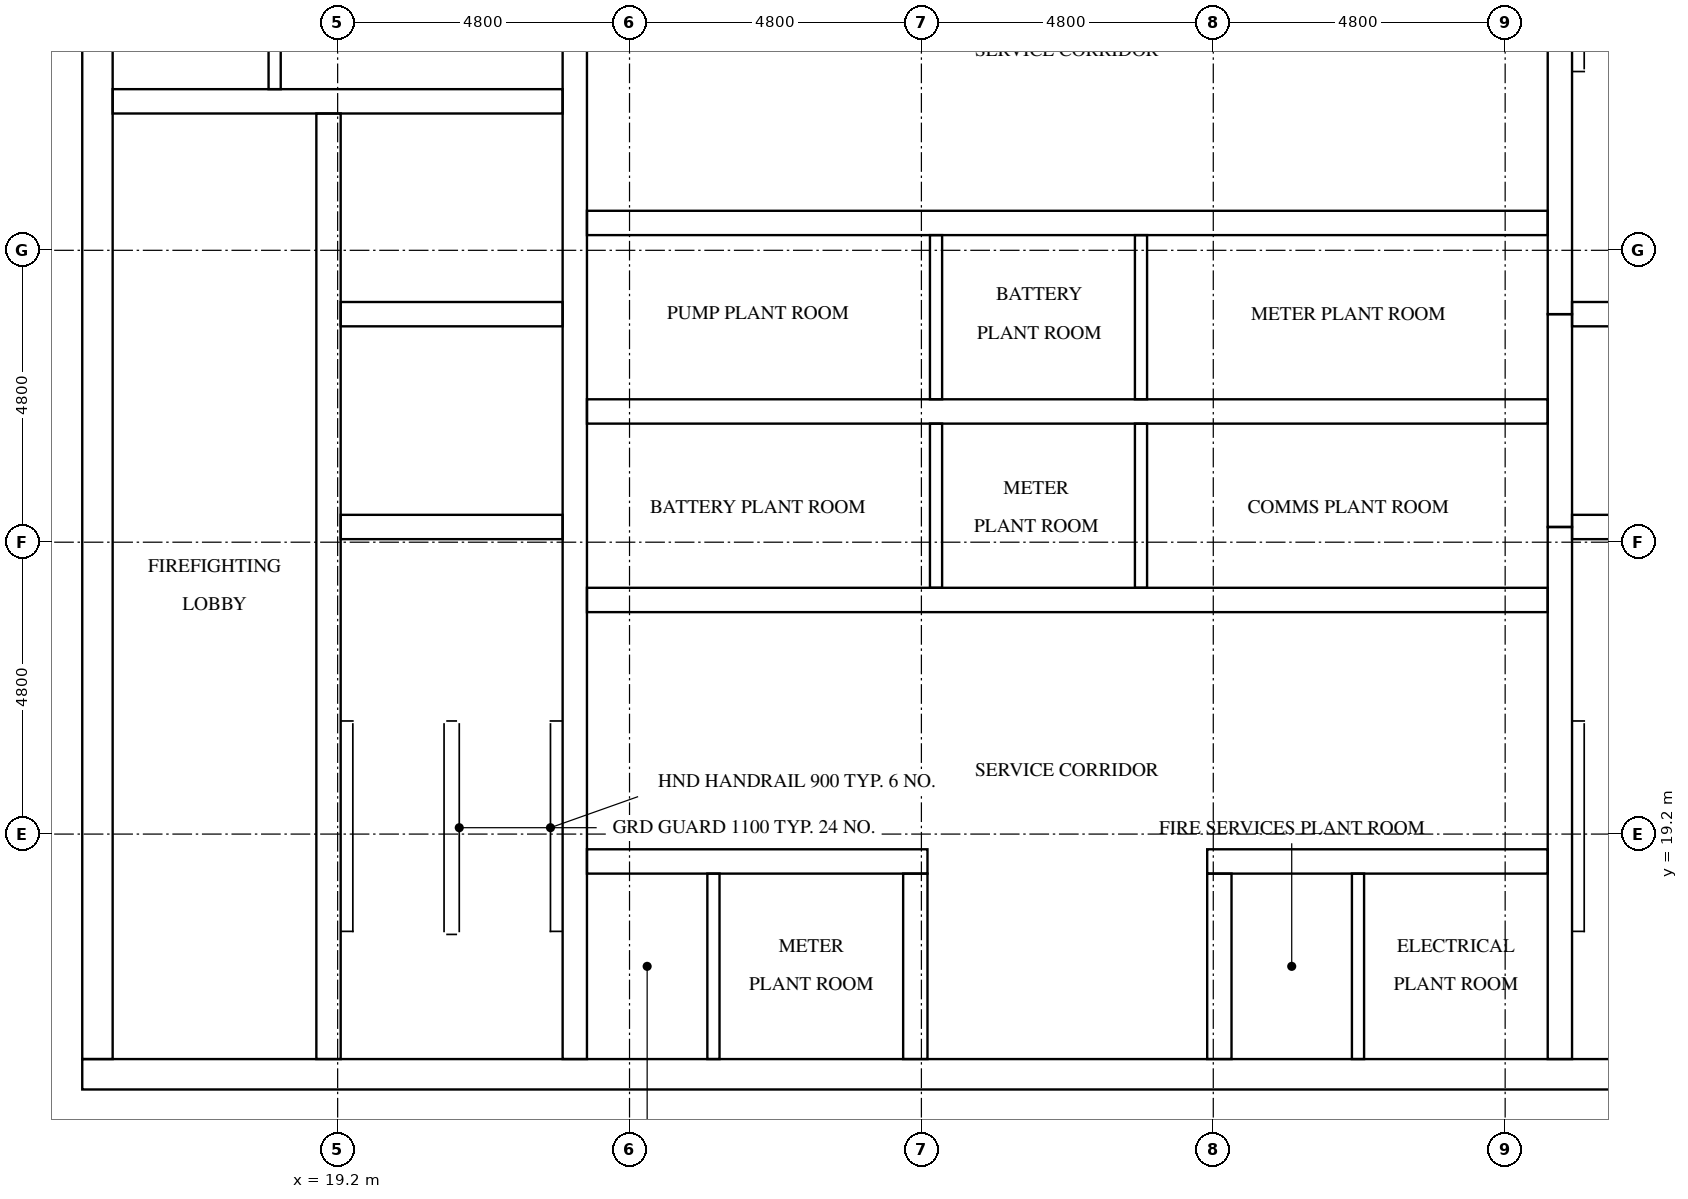
"""IFC4 building model, lengths in metres.
Left out: names, types, materials, properties, quantities, classifications, styles, units other than length and angle.
Written with IfcOpenShell. Run it as: python <this file> out.ifc"""

import sys

from ifc_helpers import new_model, si_unit, direction, frame, frame_2d, origin, place, context, subcontext, project, spatial, rectangle, extrude, element, fill, save


model = new_model("IFC4")
c1 = context("Model", 3, precision=1e-05, world=origin(), true_north=direction((0.0, 1.0)))
c2 = subcontext(c1, "Body", "Model", "MODEL_VIEW")
j1 = project(units=[si_unit("LENGTHUNIT", "METRE"), si_unit("PLANEANGLEUNIT", "RADIAN")], contexts=[c1])
p1 = place(None, origin())
s1 = spatial("IfcSite", under=j1, at=p1, CompositionType="ELEMENT")
p2 = place(p1, origin())
s2 = spatial("IfcBuilding", under=s1, at=p2, CompositionType="ELEMENT")
p3 = place(p2, frame((0.0, 0.0, 305.9)))
s3 = spatial("IfcBuildingStorey", under=s2, at=p3, CompositionType="ELEMENT", Elevation=305.9)
p4 = place(p3, frame((15.0, 15.25, 0.0), z_axis=(0.0, 0.0, 1.0), x_axis=(1.0, 0.0, 0.0)))
e1 = element("IfcWall", 1, at=p4, inside=s3, PredefinedType="SHEAR", context=c2, shape_type="SweptSolid", body=[
    extrude(rectangle(XDim=32.4, YDim=0.5, at=frame_2d((16.2, 0.0))), origin(), (0.0, 0.0, 1.0), 3.8),
])
p5 = place(p4, frame((15.3, 0.0, 0.0)))
e2 = element("IfcOpeningElement", 2, at=p5, cuts=e1, PredefinedType="OPENING", context=c2, shape_type="SweptSolid", body=[
    extrude(rectangle(XDim=1.8, YDim=2.1, at=frame_2d((0.9, 1.05))), frame((0.0, 0.26, 0.0), z_axis=(0.0, -1.0, 0.0), x_axis=(1.0, 0.0, 0.0)), (0.0, 0.0, 1.0), 0.52),
])
p6 = place(p3, frame((15.25, 15.5, 0.0), z_axis=(0.0, 0.0, 1.0), x_axis=(0.0, 1.0, 0.0)))
e3 = element("IfcWall", 3, at=p6, inside=s3, PredefinedType="SHEAR", context=c2, shape_type="SweptSolid", body=[
    extrude(rectangle(XDim=21.8, YDim=0.5, at=frame_2d((10.9, 0.0))), origin(), (0.0, 0.0, 1.0), 3.8),
])
p7 = place(p6, frame((5.26, 0.0, 0.0)))
e4 = element("IfcOpeningElement", 4, at=p7, cuts=e3, PredefinedType="OPENING", context=c2, shape_type="SweptSolid", body=[
    extrude(rectangle(XDim=1.2, YDim=2.1, at=frame_2d((0.6, 1.05))), frame((0.0, 0.26, 0.0), z_axis=(0.0, -1.0, 0.0), x_axis=(1.0, 0.0, 0.0)), (0.0, 0.0, 1.0), 0.52),
])
p8 = place(p3, frame((19.05, 15.5, 0.0), z_axis=(0.0, 0.0, 1.0), x_axis=(0.0, 1.0, 0.0)))
e5 = element("IfcWall", 5, at=p8, inside=s3, PredefinedType="SHEAR", context=c2, shape_type="SweptSolid", body=[
    extrude(rectangle(XDim=15.55, YDim=0.4, at=frame_2d((7.775, 0.0))), origin(), (0.0, 0.0, 1.0), 3.8),
])
p9 = place(p8, frame((9.95, 0.0, 0.0)))
e6 = element("IfcOpeningElement", 6, at=p9, cuts=e5, PredefinedType="OPENING", context=c2, shape_type="SweptSolid", body=[
    extrude(rectangle(XDim=1.1, YDim=2.1, at=frame_2d((0.55, 1.05))), frame((0.0, 0.21, 0.0), z_axis=(0.0, -1.0, 0.0), x_axis=(1.0, 0.0, 0.0)), (0.0, 0.0, 1.0), 0.42),
])
p10 = place(p8, frame((13.45, 0.0, 0.0)))
e7 = element("IfcOpeningElement", 7, at=p10, cuts=e5, PredefinedType="OPENING", context=c2, shape_type="SweptSolid", body=[
    extrude(rectangle(XDim=1.1, YDim=2.1, at=frame_2d((0.55, 1.05))), frame((0.0, 0.21, 0.0), z_axis=(0.0, -1.0, 0.0), x_axis=(1.0, 0.0, 0.0)), (0.0, 0.0, 1.0), 0.42),
])
p11 = place(p8, frame((0.7, 0.0, 0.0)))
e8 = element("IfcOpeningElement", 8, at=p11, cuts=e5, PredefinedType="OPENING", context=c2, shape_type="SweptSolid", body=[
    extrude(rectangle(XDim=1.2, YDim=2.1, at=frame_2d((0.6, 1.05))), frame((0.0, 0.21, 0.0), z_axis=(0.0, -1.0, 0.0), x_axis=(1.0, 0.0, 0.0)), (0.0, 0.0, 1.0), 0.42),
])
p12 = place(p3, frame((23.1, 15.5, 0.0), z_axis=(0.0, 0.0, 1.0), x_axis=(0.0, 1.0, 0.0)))
e9 = element("IfcWall", 9, at=p12, inside=s3, PredefinedType="SHEAR", context=c2, shape_type="SweptSolid", body=[
    extrude(rectangle(XDim=21.8, YDim=0.4, at=frame_2d((10.9, 0.0))), origin(), (0.0, 0.0, 1.0), 3.8),
])
p13 = place(p3, frame((39.3, 15.5, 0.0), z_axis=(0.0, 0.0, 1.0), x_axis=(0.0, 1.0, 0.0)))
e10 = element("IfcWall", 10, at=p13, inside=s3, PredefinedType="SHEAR", context=c2, shape_type="SweptSolid", body=[
    extrude(rectangle(XDim=8.75, YDim=0.4, at=frame_2d((4.375, 0.0))), origin(), (0.0, 0.0, 1.0), 3.8),
])
p14 = place(p3, frame((39.3, 24.25, 0.0), z_axis=(0.0, 0.0, 1.0), x_axis=(0.0, 1.0, 0.0)))
e11 = element("IfcWall", 11, at=p14, inside=s3, PredefinedType="SHEAR", context=c2, shape_type="SweptSolid", body=[
    extrude(rectangle(XDim=3.5, YDim=0.4, at=frame_2d((1.75, 0.0))), origin(), (0.0, 0.0, 1.0), 3.8),
])
p15 = place(p3, frame((39.3, 27.75, 0.0), z_axis=(0.0, 0.0, 1.0), x_axis=(0.0, 1.0, 0.0)))
e12 = element("IfcWall", 12, at=p15, inside=s3, PredefinedType="SHEAR", context=c2, shape_type="SweptSolid", body=[
    extrude(rectangle(XDim=9.55, YDim=0.4, at=frame_2d((4.775, 0.0))), origin(), (0.0, 0.0, 1.0), 3.8),
])
for number, where, z_axis, x_axis in (
    (13, (19.25, 24.25, 0.0), (0.0, 0.0, 1.0), (1.0, 0.0, 0.0)),
    (14, (19.25, 27.75, 0.0), (0.0, 0.0, 1.0), (1.0, 0.0, 0.0)),
):
    element("IfcWall", number, at=place(p3, frame(where, z_axis=z_axis, x_axis=x_axis)), inside=s3, PredefinedType="SHEAR", context=c2, shape_type="SweptSolid", body=[
        extrude(rectangle(XDim=3.65, YDim=0.4, at=frame_2d((1.825, 0.0))), origin(), (0.0, 0.0, 1.0), 3.8),
    ])
p16 = place(p3, frame((15.5, 31.25, 0.0), z_axis=(0.0, 0.0, 1.0), x_axis=(1.0, 0.0, 0.0)))
e15 = element("IfcWall", 15, at=p16, inside=s3, PredefinedType="SHEAR", context=c2, shape_type="SweptSolid", body=[
    extrude(rectangle(XDim=7.4, YDim=0.4, at=frame_2d((3.7, 0.0))), origin(), (0.0, 0.0, 1.0), 3.8),
])
for number, where, z_axis, x_axis in (
    (16, (39.5, 24.25, 0.0), (0.0, 0.0, 1.0), (1.0, 0.0, 0.0)),
    (17, (39.5, 27.75, 0.0), (0.0, 0.0, 1.0), (1.0, 0.0, 0.0)),
):
    element("IfcWall", number, at=place(p3, frame(where, z_axis=z_axis, x_axis=x_axis)), inside=s3, PredefinedType="SHEAR", context=c2, shape_type="SweptSolid", body=[
        extrude(rectangle(XDim=3.65, YDim=0.4, at=frame_2d((1.825, 0.0))), origin(), (0.0, 0.0, 1.0), 3.8),
    ])
p17 = place(p3, frame((23.3, 18.75, 0.0), z_axis=(0.0, 0.0, 1.0), x_axis=(1.0, 0.0, 0.0)))
e18 = element("IfcWall", 18, at=p17, inside=s3, PredefinedType="SHEAR", context=c2, shape_type="SweptSolid", body=[
    extrude(rectangle(XDim=5.6, YDim=0.4, at=frame_2d((2.8, 0.0))), origin(), (0.0, 0.0, 1.0), 3.8),
])
p18 = place(p17, frame((0.49, 0.0, 0.0)))
e19 = element("IfcOpeningElement", 19, at=p18, cuts=e18, PredefinedType="OPENING", context=c2, shape_type="SweptSolid", body=[
    extrude(rectangle(XDim=1.0, YDim=2.1, at=frame_2d((0.5, 1.05))), frame((0.0, 0.21, 0.0), z_axis=(0.0, -1.0, 0.0), x_axis=(1.0, 0.0, 0.0)), (0.0, 0.0, 1.0), 0.42),
])
p19 = place(p17, frame((3.19, 0.0, 0.0)))
e20 = element("IfcOpeningElement", 20, at=p19, cuts=e18, PredefinedType="OPENING", context=c2, shape_type="SweptSolid", body=[
    extrude(rectangle(XDim=1.0, YDim=2.1, at=frame_2d((0.5, 1.05))), frame((0.0, 0.21, 0.0), z_axis=(0.0, -1.0, 0.0), x_axis=(1.0, 0.0, 0.0)), (0.0, 0.0, 1.0), 0.42),
])
p20 = place(p3, frame((33.5, 18.75, 0.0), z_axis=(0.0, 0.0, 1.0), x_axis=(1.0, 0.0, 0.0)))
e21 = element("IfcWall", 21, at=p20, inside=s3, PredefinedType="SHEAR", context=c2, shape_type="SweptSolid", body=[
    extrude(rectangle(XDim=5.6, YDim=0.4, at=frame_2d((2.8, 0.0))), origin(), (0.0, 0.0, 1.0), 3.8),
])
p21 = place(p20, frame((0.89, 0.0, 0.0)))
e22 = element("IfcOpeningElement", 22, at=p21, cuts=e21, PredefinedType="OPENING", context=c2, shape_type="SweptSolid", body=[
    extrude(rectangle(XDim=1.0, YDim=2.1, at=frame_2d((0.5, 1.05))), frame((0.0, 0.21, 0.0), z_axis=(0.0, -1.0, 0.0), x_axis=(1.0, 0.0, 0.0)), (0.0, 0.0, 1.0), 0.42),
])
p22 = place(p20, frame((3.59, 0.0, 0.0)))
e23 = element("IfcOpeningElement", 23, at=p22, cuts=e21, PredefinedType="OPENING", context=c2, shape_type="SweptSolid", body=[
    extrude(rectangle(XDim=1.0, YDim=2.1, at=frame_2d((0.5, 1.05))), frame((0.0, 0.21, 0.0), z_axis=(0.0, -1.0, 0.0), x_axis=(1.0, 0.0, 0.0)), (0.0, 0.0, 1.0), 0.42),
])
p23 = place(p3, frame((23.3, 23.05, 0.0), z_axis=(0.0, 0.0, 1.0), x_axis=(1.0, 0.0, 0.0)))
e24 = element("IfcWall", 24, at=p23, inside=s3, PredefinedType="SHEAR", context=c2, shape_type="SweptSolid", body=[
    extrude(rectangle(XDim=15.8, YDim=0.4, at=frame_2d((7.9, 0.0))), origin(), (0.0, 0.0, 1.0), 3.8),
])
p24 = place(p23, frame((2.32, 0.0, 0.0)))
e25 = element("IfcOpeningElement", 25, at=p24, cuts=e24, PredefinedType="OPENING", context=c2, shape_type="SweptSolid", body=[
    extrude(rectangle(XDim=1.0, YDim=2.1, at=frame_2d((0.5, 1.05))), frame((0.0, 0.21, 0.0), z_axis=(0.0, -1.0, 0.0), x_axis=(1.0, 0.0, 0.0)), (0.0, 0.0, 1.0), 0.42),
])
p25 = place(p23, frame((6.926, 0.0, 0.0)))
e26 = element("IfcOpeningElement", 26, at=p25, cuts=e24, PredefinedType="OPENING", context=c2, shape_type="SweptSolid", body=[
    extrude(rectangle(XDim=1.0, YDim=2.1, at=frame_2d((0.5, 1.05))), frame((0.0, 0.21, 0.0), z_axis=(0.0, -1.0, 0.0), x_axis=(1.0, 0.0, 0.0)), (0.0, 0.0, 1.0), 0.42),
])
p26 = place(p23, frame((12.006, 0.0, 0.0)))
e27 = element("IfcOpeningElement", 27, at=p26, cuts=e24, PredefinedType="OPENING", context=c2, shape_type="SweptSolid", body=[
    extrude(rectangle(XDim=1.0, YDim=2.1, at=frame_2d((0.5, 1.05))), frame((0.0, 0.21, 0.0), z_axis=(0.0, -1.0, 0.0), x_axis=(1.0, 0.0, 0.0)), (0.0, 0.0, 1.0), 0.42),
])
p27 = place(p3, frame((23.3, 26.15, 0.0), z_axis=(0.0, 0.0, 1.0), x_axis=(1.0, 0.0, 0.0)))
e28 = element("IfcWall", 28, at=p27, inside=s3, PredefinedType="SHEAR", context=c2, shape_type="SweptSolid", body=[
    extrude(rectangle(XDim=15.8, YDim=0.4, at=frame_2d((7.9, 0.0))), origin(), (0.0, 0.0, 1.0), 3.8),
])
p28 = place(p3, frame((23.3, 29.25, 0.0), z_axis=(0.0, 0.0, 1.0), x_axis=(1.0, 0.0, 0.0)))
e29 = element("IfcWall", 29, at=p28, inside=s3, PredefinedType="SHEAR", context=c2, shape_type="SweptSolid", body=[
    extrude(rectangle(XDim=15.8, YDim=0.4, at=frame_2d((7.9, 0.0))), origin(), (0.0, 0.0, 1.0), 3.8),
])
p29 = place(p28, frame((2.32, 0.0, 0.0)))
e30 = element("IfcOpeningElement", 30, at=p29, cuts=e29, PredefinedType="OPENING", context=c2, shape_type="SweptSolid", body=[
    extrude(rectangle(XDim=1.0, YDim=2.1, at=frame_2d((0.5, 1.05))), frame((0.0, 0.21, 0.0), z_axis=(0.0, -1.0, 0.0), x_axis=(1.0, 0.0, 0.0)), (0.0, 0.0, 1.0), 0.42),
])
p30 = place(p28, frame((6.926, 0.0, 0.0)))
e31 = element("IfcOpeningElement", 31, at=p30, cuts=e29, PredefinedType="OPENING", context=c2, shape_type="SweptSolid", body=[
    extrude(rectangle(XDim=1.0, YDim=2.1, at=frame_2d((0.5, 1.05))), frame((0.0, 0.21, 0.0), z_axis=(0.0, -1.0, 0.0), x_axis=(1.0, 0.0, 0.0)), (0.0, 0.0, 1.0), 0.42),
])
p31 = place(p28, frame((12.006, 0.0, 0.0)))
e32 = element("IfcOpeningElement", 32, at=p31, cuts=e29, PredefinedType="OPENING", context=c2, shape_type="SweptSolid", body=[
    extrude(rectangle(XDim=1.0, YDim=2.1, at=frame_2d((0.5, 1.05))), frame((0.0, 0.21, 0.0), z_axis=(0.0, -1.0, 0.0), x_axis=(1.0, 0.0, 0.0)), (0.0, 0.0, 1.0), 0.42),
])
for number, where, z_axis, x_axis in (
    (33, (28.7, 15.5, 0.0), (0.0, 0.0, 1.0), (0.0, 1.0, 0.0)),
    (34, (33.7, 15.5, 0.0), (0.0, 0.0, 1.0), (0.0, 1.0, 0.0)),
):
    element("IfcWall", number, at=place(p3, frame(where, z_axis=z_axis, x_axis=x_axis)), inside=s3, PredefinedType="SHEAR", context=c2, shape_type="SweptSolid", body=[
        extrude(rectangle(XDim=3.05, YDim=0.4, at=frame_2d((1.525, 0.0))), origin(), (0.0, 0.0, 1.0), 3.8),
    ])
p32 = place(p3, frame((18.164, 31.45, 0.0), z_axis=(0.0, 0.0, 1.0), x_axis=(0.0, 1.0, 0.0)))
e35 = element("IfcWall", 35, at=p32, inside=s3, PredefinedType="PARTITIONING", context=c2, shape_type="SweptSolid", body=[
    extrude(rectangle(XDim=5.85, YDim=0.2, at=frame_2d((2.925, 0.0))), origin(), (0.0, 0.0, 1.0), 3.8),
])
for number, where, z_axis, x_axis in (
    (36, (29.041, 23.25, 0.0), (0.0, 0.0, 1.0), (0.0, 1.0, 0.0)),
    (37, (32.411, 23.25, 0.0), (0.0, 0.0, 1.0), (0.0, 1.0, 0.0)),
    (38, (29.041, 26.35, 0.0), (0.0, 0.0, 1.0), (0.0, 1.0, 0.0)),
    (39, (32.411, 26.35, 0.0), (0.0, 0.0, 1.0), (0.0, 1.0, 0.0)),
):
    element("IfcWall", number, at=place(p3, frame(where, z_axis=z_axis, x_axis=x_axis)), inside=s3, PredefinedType="PARTITIONING", context=c2, shape_type="SweptSolid", body=[
        extrude(rectangle(XDim=2.7, YDim=0.2, at=frame_2d((1.35, 0.0))), origin(), (0.0, 0.0, 1.0), 3.8),
    ])
for number, where, z_axis, x_axis in (
    (40, (25.38, 15.5, 0.0), (0.0, 0.0, 1.0), (0.0, 1.0, 0.0)),
    (41, (35.98, 15.5, 0.0), (0.0, 0.0, 1.0), (0.0, 1.0, 0.0)),
):
    element("IfcWall", number, at=place(p3, frame(where, z_axis=z_axis, x_axis=x_axis)), inside=s3, PredefinedType="PARTITIONING", context=c2, shape_type="SweptSolid", body=[
        extrude(rectangle(XDim=3.05, YDim=0.2, at=frame_2d((1.525, 0.0))), origin(), (0.0, 0.0, 1.0), 3.8),
    ])
p33 = place(p9, origin())
e42 = element("IfcDoor", 42, at=p33, inside=s3, OperationType="DOUBLE_DOOR_SLIDING", PredefinedType="DOOR", context=c2, shape_type="SweptSolid", body=[
    extrude(rectangle(XDim=1.1, YDim=2.1, at=frame_2d((0.55, 1.05))), frame((0.0, 0.025, 0.0), z_axis=(0.0, -1.0, 0.0), x_axis=(1.0, 0.0, 0.0)), (0.0, 0.0, 1.0), 0.05),
])
fill(e6, e42)
p34 = place(p10, origin())
e43 = element("IfcDoor", 43, at=p34, inside=s3, OperationType="DOUBLE_DOOR_SLIDING", PredefinedType="DOOR", context=c2, shape_type="SweptSolid", body=[
    extrude(rectangle(XDim=1.1, YDim=2.1, at=frame_2d((0.55, 1.05))), frame((0.0, 0.025, 0.0), z_axis=(0.0, -1.0, 0.0), x_axis=(1.0, 0.0, 0.0)), (0.0, 0.0, 1.0), 0.05),
])
fill(e7, e43)
p35 = place(p11, frame((1.2, 0.0, 0.0), z_axis=(0.0, 0.0, 1.0), x_axis=(-1.0, 0.0, 0.0)))
e44 = element("IfcDoor", 44, at=p35, inside=s3, OperationType="SINGLE_SWING_LEFT", PredefinedType="DOOR", context=c2, shape_type="SweptSolid", body=[
    extrude(rectangle(XDim=1.2, YDim=2.1, at=frame_2d((0.6, 1.05))), frame((0.0, 0.025, 0.0), z_axis=(0.0, -1.0, 0.0), x_axis=(1.0, 0.0, 0.0)), (0.0, 0.0, 1.0), 0.05),
])
fill(e8, e44)
p36 = place(p5, frame((1.8, 0.0, 0.0), z_axis=(0.0, 0.0, 1.0), x_axis=(-1.0, 0.0, 0.0)))
e45 = element("IfcDoor", 45, at=p36, inside=s3, OperationType="DOUBLE_DOOR_SINGLE_SWING", PredefinedType="DOOR", context=c2, shape_type="SweptSolid", body=[
    extrude(rectangle(XDim=1.8, YDim=2.1, at=frame_2d((0.9, 1.05))), frame((0.0, 0.025, 0.0), z_axis=(0.0, -1.0, 0.0), x_axis=(1.0, 0.0, 0.0)), (0.0, 0.0, 1.0), 0.05),
])
fill(e2, e45)
p37 = place(p7, frame((1.2, 0.0, 0.0), z_axis=(0.0, 0.0, 1.0), x_axis=(-1.0, 0.0, 0.0)))
e46 = element("IfcDoor", 46, at=p37, inside=s3, OperationType="SINGLE_SWING_RIGHT", PredefinedType="DOOR", context=c2, shape_type="SweptSolid", body=[
    extrude(rectangle(XDim=1.2, YDim=2.1, at=frame_2d((0.6, 1.05))), frame((0.0, 0.025, 0.0), z_axis=(0.0, -1.0, 0.0), x_axis=(1.0, 0.0, 0.0)), (0.0, 0.0, 1.0), 0.05),
])
fill(e4, e46)
p38 = place(p24, frame((1.0, 0.0, 0.0), z_axis=(0.0, 0.0, 1.0), x_axis=(-1.0, 0.0, 0.0)))
e47 = element("IfcDoor", 47, at=p38, inside=s3, OperationType="SINGLE_SWING_RIGHT", PredefinedType="DOOR", context=c2, shape_type="SweptSolid", body=[
    extrude(rectangle(XDim=1.0, YDim=2.1, at=frame_2d((0.5, 1.05))), frame((0.0, 0.025, 0.0), z_axis=(0.0, -1.0, 0.0), x_axis=(1.0, 0.0, 0.0)), (0.0, 0.0, 1.0), 0.05),
])
fill(e25, e47)
p39 = place(p25, frame((1.0, 0.0, 0.0), z_axis=(0.0, 0.0, 1.0), x_axis=(-1.0, 0.0, 0.0)))
e48 = element("IfcDoor", 48, at=p39, inside=s3, OperationType="SINGLE_SWING_LEFT", PredefinedType="DOOR", context=c2, shape_type="SweptSolid", body=[
    extrude(rectangle(XDim=1.0, YDim=2.1, at=frame_2d((0.5, 1.05))), frame((0.0, 0.025, 0.0), z_axis=(0.0, -1.0, 0.0), x_axis=(1.0, 0.0, 0.0)), (0.0, 0.0, 1.0), 0.05),
])
fill(e26, e48)
p40 = place(p26, frame((1.0, 0.0, 0.0), z_axis=(0.0, 0.0, 1.0), x_axis=(-1.0, 0.0, 0.0)))
e49 = element("IfcDoor", 49, at=p40, inside=s3, OperationType="SINGLE_SWING_RIGHT", PredefinedType="DOOR", context=c2, shape_type="SweptSolid", body=[
    extrude(rectangle(XDim=1.0, YDim=2.1, at=frame_2d((0.5, 1.05))), frame((0.0, 0.025, 0.0), z_axis=(0.0, -1.0, 0.0), x_axis=(1.0, 0.0, 0.0)), (0.0, 0.0, 1.0), 0.05),
])
fill(e27, e49)
p41 = place(p29, origin())
e50 = element("IfcDoor", 50, at=p41, inside=s3, OperationType="SINGLE_SWING_LEFT", PredefinedType="DOOR", context=c2, shape_type="SweptSolid", body=[
    extrude(rectangle(XDim=1.0, YDim=2.1, at=frame_2d((0.5, 1.05))), frame((0.0, 0.025, 0.0), z_axis=(0.0, -1.0, 0.0), x_axis=(1.0, 0.0, 0.0)), (0.0, 0.0, 1.0), 0.05),
])
fill(e30, e50)
p42 = place(p30, origin())
e51 = element("IfcDoor", 51, at=p42, inside=s3, OperationType="SINGLE_SWING_RIGHT", PredefinedType="DOOR", context=c2, shape_type="SweptSolid", body=[
    extrude(rectangle(XDim=1.0, YDim=2.1, at=frame_2d((0.5, 1.05))), frame((0.0, 0.025, 0.0), z_axis=(0.0, -1.0, 0.0), x_axis=(1.0, 0.0, 0.0)), (0.0, 0.0, 1.0), 0.05),
])
fill(e31, e51)
p43 = place(p31, origin())
e52 = element("IfcDoor", 52, at=p43, inside=s3, OperationType="SINGLE_SWING_LEFT", PredefinedType="DOOR", context=c2, shape_type="SweptSolid", body=[
    extrude(rectangle(XDim=1.0, YDim=2.1, at=frame_2d((0.5, 1.05))), frame((0.0, 0.025, 0.0), z_axis=(0.0, -1.0, 0.0), x_axis=(1.0, 0.0, 0.0)), (0.0, 0.0, 1.0), 0.05),
])
fill(e32, e52)
p44 = place(p18, origin())
e53 = element("IfcDoor", 53, at=p44, inside=s3, OperationType="SINGLE_SWING_RIGHT", PredefinedType="DOOR", context=c2, shape_type="SweptSolid", body=[
    extrude(rectangle(XDim=1.0, YDim=2.1, at=frame_2d((0.5, 1.05))), frame((0.0, 0.025, 0.0), z_axis=(0.0, -1.0, 0.0), x_axis=(1.0, 0.0, 0.0)), (0.0, 0.0, 1.0), 0.05),
])
fill(e19, e53)
p45 = place(p19, origin())
e54 = element("IfcDoor", 54, at=p45, inside=s3, OperationType="SINGLE_SWING_LEFT", PredefinedType="DOOR", context=c2, shape_type="SweptSolid", body=[
    extrude(rectangle(XDim=1.0, YDim=2.1, at=frame_2d((0.5, 1.05))), frame((0.0, 0.025, 0.0), z_axis=(0.0, -1.0, 0.0), x_axis=(1.0, 0.0, 0.0)), (0.0, 0.0, 1.0), 0.05),
])
fill(e20, e54)
p46 = place(p21, origin())
e55 = element("IfcDoor", 55, at=p46, inside=s3, OperationType="SINGLE_SWING_RIGHT", PredefinedType="DOOR", context=c2, shape_type="SweptSolid", body=[
    extrude(rectangle(XDim=1.0, YDim=2.1, at=frame_2d((0.5, 1.05))), frame((0.0, 0.025, 0.0), z_axis=(0.0, -1.0, 0.0), x_axis=(1.0, 0.0, 0.0)), (0.0, 0.0, 1.0), 0.05),
])
fill(e22, e55)
p47 = place(p22, origin())
e56 = element("IfcDoor", 56, at=p47, inside=s3, OperationType="SINGLE_SWING_LEFT", PredefinedType="DOOR", context=c2, shape_type="SweptSolid", body=[
    extrude(rectangle(XDim=1.0, YDim=2.1, at=frame_2d((0.5, 1.05))), frame((0.0, 0.025, 0.0), z_axis=(0.0, -1.0, 0.0), x_axis=(1.0, 0.0, 0.0)), (0.0, 0.0, 1.0), 0.05),
])
fill(e23, e56)
save(model, sys.argv[1])
